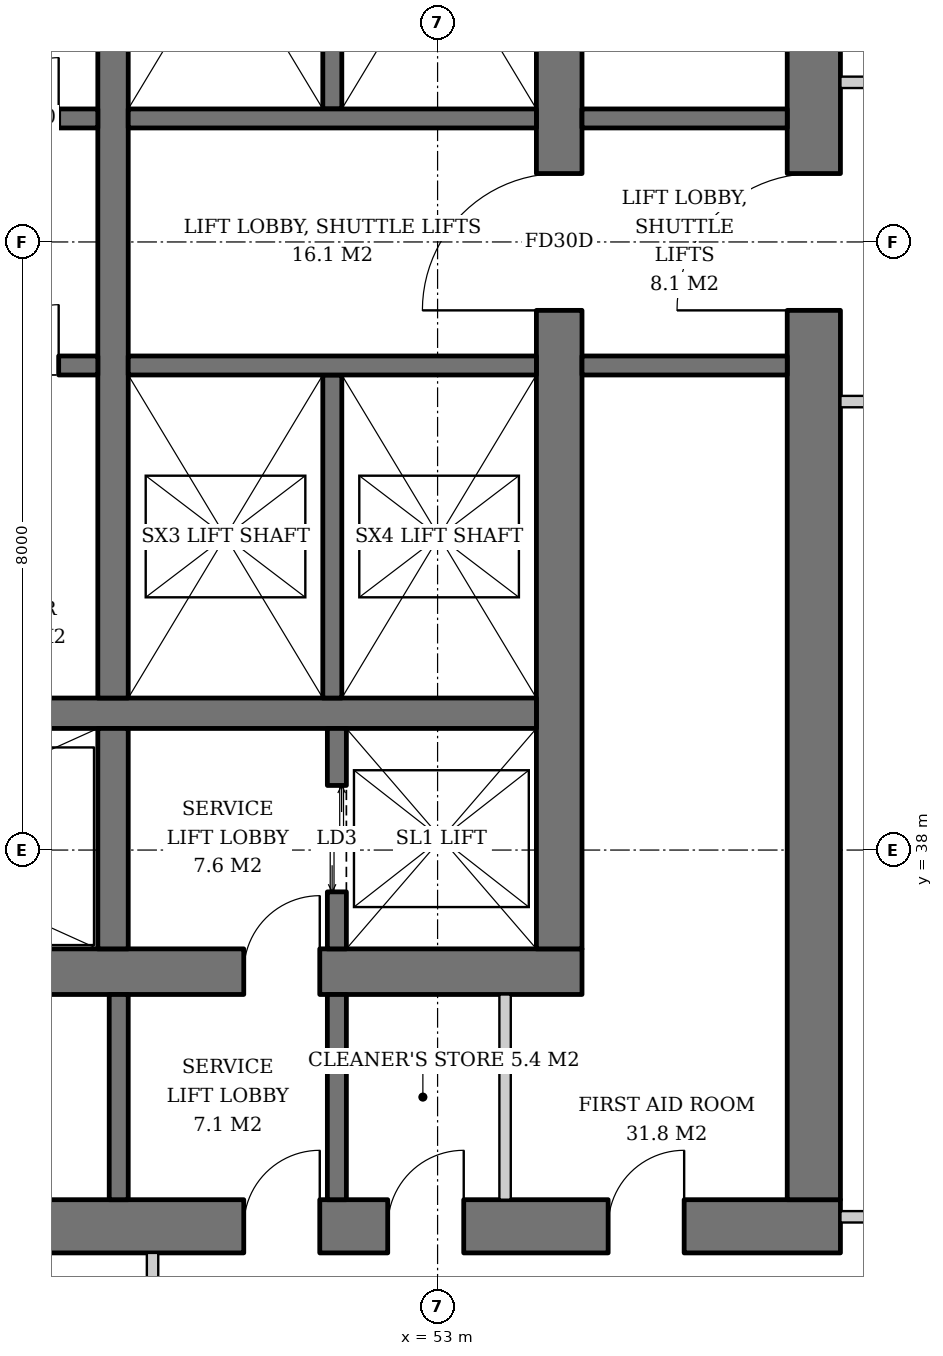
"""IFC4 building model, lengths in metres.
Left out: names, types, materials, properties, quantities, classifications, styles, units other than length and angle.
Written with IfcOpenShell. Run it as: python <this file> out.ifc"""

import sys

from ifc_helpers import new_model, si_unit, direction, frame, frame_2d, origin, place, context, subcontext, project, spatial, rectangle, extrude, element, fill, save


model = new_model("IFC4")
c1 = context("Model", 3, precision=1e-05, world=origin(), true_north=direction((0.0, 1.0)))
c2 = subcontext(c1, "Body", "Model", "MODEL_VIEW")
j1 = project(units=[si_unit("LENGTHUNIT", "METRE"), si_unit("PLANEANGLEUNIT", "RADIAN")], contexts=[c1])
p1 = place(None, origin())
s1 = spatial("IfcSite", under=j1, at=p1, CompositionType="ELEMENT")
p2 = place(p1, origin())
s2 = spatial("IfcBuilding", under=s1, at=p2, CompositionType="ELEMENT")
p3 = place(p2, frame((0.0, 0.0, 142.6)))
s3 = spatial("IfcBuildingStorey", under=s2, at=p3, CompositionType="ELEMENT", Elevation=142.6)
p4 = place(p3, frame((35.1, 36.4, 0.0), z_axis=(0.0, 0.0, 1.0), x_axis=(1.0, 0.0, 0.0)))
e1 = element("IfcWall", 1, at=p4, inside=s3, PredefinedType="SHEAR", context=c2, shape_type="SweptSolid", body=[
    extrude(rectangle(XDim=19.8, YDim=0.6, at=frame_2d((9.9, 0.0))), origin(), (0.0, 0.0, 1.0), 3.8),
])
p5 = place(p4, frame((3.9, 0.0, 0.0)))
e2 = element("IfcOpeningElement", 2, at=p5, cuts=e1, PredefinedType="OPENING", context=c2, shape_type="SweptSolid", body=[
    extrude(rectangle(XDim=1.0, YDim=2.1, at=frame_2d((0.5, 1.05))), frame((0.0, 0.31, 0.0), z_axis=(0.0, -1.0, 0.0), x_axis=(1.0, 0.0, 0.0)), (0.0, 0.0, 1.0), 0.62),
])
p6 = place(p4, frame((15.35, 0.0, 0.0)))
e3 = element("IfcOpeningElement", 3, at=p6, cuts=e1, PredefinedType="OPENING", context=c2, shape_type="SweptSolid", body=[
    extrude(rectangle(XDim=1.0, YDim=2.1, at=frame_2d((0.5, 1.05))), frame((0.0, 0.31, 0.0), z_axis=(0.0, -1.0, 0.0), x_axis=(1.0, 0.0, 0.0)), (0.0, 0.0, 1.0), 0.62),
])
p7 = place(p3, frame((54.6, 36.7, 0.0), z_axis=(0.0, 0.0, 1.0), x_axis=(0.0, 1.0, 0.0)))
e4 = element("IfcWall", 4, at=p7, inside=s3, PredefinedType="SHEAR", context=c2, shape_type="SweptSolid", body=[
    extrude(rectangle(XDim=18.6, YDim=0.6, at=frame_2d((9.3, 0.0))), origin(), (0.0, 0.0, 1.0), 3.8),
])
p8 = place(p7, frame((8.4, 0.0, 0.0)))
e5 = element("IfcOpeningElement", 5, at=p8, cuts=e4, PredefinedType="OPENING", context=c2, shape_type="SweptSolid", body=[
    extrude(rectangle(XDim=1.8, YDim=2.4, at=frame_2d((0.9, 1.2))), frame((0.0, 0.31, 0.0), z_axis=(0.0, -1.0, 0.0), x_axis=(1.0, 0.0, 0.0)), (0.0, 0.0, 1.0), 0.62),
])
p9 = place(p3, frame((31.7, 33.05, 0.0), z_axis=(0.0, 0.0, 1.0), x_axis=(1.0, 0.0, 0.0)))
e6 = element("IfcWall", 6, at=p9, inside=s3, PredefinedType="SHEAR", context=c2, shape_type="SweptSolid", body=[
    extrude(rectangle(XDim=26.6, YDim=0.7, at=frame_2d((13.3, 0.0))), origin(), (0.0, 0.0, 1.0), 3.8),
])
p10 = place(p9, frame((7.3, 0.0, 0.0)))
e7 = element("IfcOpeningElement", 7, at=p10, cuts=e6, PredefinedType="OPENING", context=c2, shape_type="SweptSolid", body=[
    extrude(rectangle(XDim=1.0, YDim=2.1, at=frame_2d((0.5, 1.05))), frame((0.0, 0.36, 0.0), z_axis=(0.0, -1.0, 0.0), x_axis=(1.0, 0.0, 0.0)), (0.0, 0.0, 1.0), 0.72),
])
p11 = place(p9, frame((18.75, 0.0, 0.0)))
e8 = element("IfcOpeningElement", 8, at=p11, cuts=e6, PredefinedType="OPENING", context=c2, shape_type="SweptSolid", body=[
    extrude(rectangle(XDim=1.0, YDim=2.1, at=frame_2d((0.5, 1.05))), frame((0.0, 0.36, 0.0), z_axis=(0.0, -1.0, 0.0), x_axis=(1.0, 0.0, 0.0)), (0.0, 0.0, 1.0), 0.72),
])
p12 = place(p9, frame((1.85, 0.0, 0.0)))
e9 = element("IfcOpeningElement", 9, at=p12, cuts=e6, PredefinedType="OPENING", context=c2, shape_type="SweptSolid", body=[
    extrude(rectangle(XDim=1.0, YDim=2.1, at=frame_2d((0.5, 1.05))), frame((0.0, 0.36, 0.0), z_axis=(0.0, -1.0, 0.0), x_axis=(1.0, 0.0, 0.0)), (0.0, 0.0, 1.0), 0.72),
])
p13 = place(p9, frame((4.7, 0.0, 0.0)))
e10 = element("IfcOpeningElement", 10, at=p13, cuts=e6, PredefinedType="OPENING", context=c2, shape_type="SweptSolid", body=[
    extrude(rectangle(XDim=1.0, YDim=2.1, at=frame_2d((0.5, 1.05))), frame((0.0, 0.36, 0.0), z_axis=(0.0, -1.0, 0.0), x_axis=(1.0, 0.0, 0.0)), (0.0, 0.0, 1.0), 0.72),
])
p14 = place(p9, frame((12.44, 0.0, 0.0)))
e11 = element("IfcOpeningElement", 11, at=p14, cuts=e6, PredefinedType="OPENING", context=c2, shape_type="SweptSolid", body=[
    extrude(rectangle(XDim=1.0, YDim=2.1, at=frame_2d((0.5, 1.05))), frame((0.0, 0.36, 0.0), z_axis=(0.0, -1.0, 0.0), x_axis=(1.0, 0.0, 0.0)), (0.0, 0.0, 1.0), 0.72),
])
p15 = place(p9, frame((20.644, 0.0, 0.0)))
e12 = element("IfcOpeningElement", 12, at=p15, cuts=e6, PredefinedType="OPENING", context=c2, shape_type="SweptSolid", body=[
    extrude(rectangle(XDim=1.0, YDim=2.1, at=frame_2d((0.5, 1.05))), frame((0.0, 0.36, 0.0), z_axis=(0.0, -1.0, 0.0), x_axis=(1.0, 0.0, 0.0)), (0.0, 0.0, 1.0), 0.72),
])
p16 = place(p9, frame((23.544, 0.0, 0.0)))
e13 = element("IfcOpeningElement", 13, at=p16, cuts=e6, PredefinedType="OPENING", context=c2, shape_type="SweptSolid", body=[
    extrude(rectangle(XDim=1.0, YDim=2.1, at=frame_2d((0.5, 1.05))), frame((0.0, 0.36, 0.0), z_axis=(0.0, -1.0, 0.0), x_axis=(1.0, 0.0, 0.0)), (0.0, 0.0, 1.0), 0.72),
])
p17 = place(p3, frame((57.95, 33.4, 0.0), z_axis=(0.0, 0.0, 1.0), x_axis=(0.0, 1.0, 0.0)))
e14 = element("IfcWall", 14, at=p17, inside=s3, PredefinedType="SHEAR", context=c2, shape_type="SweptSolid", body=[
    extrude(rectangle(XDim=25.2, YDim=0.7, at=frame_2d((12.6, 0.0))), origin(), (0.0, 0.0, 1.0), 3.8),
])
p18 = place(p17, frame((11.7, 0.0, 0.0)))
e15 = element("IfcOpeningElement", 15, at=p18, cuts=e14, PredefinedType="OPENING", context=c2, shape_type="SweptSolid", body=[
    extrude(rectangle(XDim=1.8, YDim=2.4, at=frame_2d((0.9, 1.2))), frame((0.0, 0.36, 0.0), z_axis=(0.0, -1.0, 0.0), x_axis=(1.0, 0.0, 0.0)), (0.0, 0.0, 1.0), 0.72),
])
p19 = place(p3, frame((35.7, 39.8, 0.0), z_axis=(0.0, 0.0, 1.0), x_axis=(1.0, 0.0, 0.0)))
e16 = element("IfcWall", 16, at=p19, inside=s3, PredefinedType="SHEAR", context=c2, shape_type="SweptSolid", body=[
    extrude(rectangle(XDim=18.6, YDim=0.4, at=frame_2d((9.3, 0.0))), origin(), (0.0, 0.0, 1.0), 3.8),
])
p20 = place(p3, frame((48.73, 36.7, 0.0), z_axis=(0.0, 0.0, 1.0), x_axis=(0.0, 1.0, 0.0)))
e17 = element("IfcWall", 17, at=p20, inside=s3, PredefinedType="SHEAR", context=c2, shape_type="SweptSolid", body=[
    extrude(rectangle(XDim=2.9, YDim=0.4, at=frame_2d((1.45, 0.0))), origin(), (0.0, 0.0, 1.0), 3.8),
])
p21 = place(p3, frame((48.73, 40.0, 0.0), z_axis=(0.0, 0.0, 1.0), x_axis=(0.0, 1.0, 0.0)))
e18 = element("IfcWall", 18, at=p21, inside=s3, PredefinedType="SHEAR", context=c2, shape_type="SweptSolid", body=[
    extrude(rectangle(XDim=12.0, YDim=0.4, at=frame_2d((6.0, 0.0))), origin(), (0.0, 0.0, 1.0), 3.8),
])
p22 = place(p3, frame((51.675, 36.7, 0.0), z_axis=(0.0, 0.0, 1.0), x_axis=(0.0, 1.0, 0.0)))
e19 = element("IfcWall", 19, at=p22, inside=s3, PredefinedType="SHEAR", context=c2, shape_type="SweptSolid", body=[
    extrude(rectangle(XDim=2.9, YDim=0.25, at=frame_2d((1.45, 0.0))), origin(), (0.0, 0.0, 1.0), 3.8),
])
p23 = place(p22, frame((0.75, 0.0, 0.0)))
e20 = element("IfcOpeningElement", 20, at=p23, cuts=e19, PredefinedType="OPENING", context=c2, shape_type="SweptSolid", body=[
    extrude(rectangle(XDim=1.4, YDim=2.4, at=frame_2d((0.7, 1.2))), frame((0.0, 0.135, 0.0), z_axis=(0.0, -1.0, 0.0), x_axis=(1.0, 0.0, 0.0)), (0.0, 0.0, 1.0), 0.27),
])
p24 = place(p3, frame((35.7, 47.625, 0.0), z_axis=(0.0, 0.0, 1.0), x_axis=(1.0, 0.0, 0.0)))
e21 = element("IfcWall", 21, at=p24, inside=s3, PredefinedType="SHEAR", context=c2, shape_type="SweptSolid", body=[
    extrude(rectangle(XDim=12.83, YDim=0.25, at=frame_2d((6.415, 0.0))), origin(), (0.0, 0.0, 1.0), 3.8),
])
p25 = place(p24, frame((0.7, 0.0, 0.0)))
e22 = element("IfcOpeningElement", 22, at=p25, cuts=e21, PredefinedType="OPENING", context=c2, shape_type="SweptSolid", body=[
    extrude(rectangle(XDim=1.1, YDim=2.2, at=frame_2d((0.55, 1.1))), frame((0.0, 0.135, 0.0), z_axis=(0.0, -1.0, 0.0), x_axis=(1.0, 0.0, 0.0)), (0.0, 0.0, 1.0), 0.27),
])
p26 = place(p24, frame((3.45, 0.0, 0.0)))
e23 = element("IfcOpeningElement", 23, at=p26, cuts=e21, PredefinedType="OPENING", context=c2, shape_type="SweptSolid", body=[
    extrude(rectangle(XDim=1.1, YDim=2.2, at=frame_2d((0.55, 1.1))), frame((0.0, 0.135, 0.0), z_axis=(0.0, -1.0, 0.0), x_axis=(1.0, 0.0, 0.0)), (0.0, 0.0, 1.0), 0.27),
])
p27 = place(p24, frame((6.2, 0.0, 0.0)))
e24 = element("IfcOpeningElement", 24, at=p27, cuts=e21, PredefinedType="OPENING", context=c2, shape_type="SweptSolid", body=[
    extrude(rectangle(XDim=1.1, YDim=2.2, at=frame_2d((0.55, 1.1))), frame((0.0, 0.135, 0.0), z_axis=(0.0, -1.0, 0.0), x_axis=(1.0, 0.0, 0.0)), (0.0, 0.0, 1.0), 0.27),
])
p28 = place(p24, frame((8.95, 0.0, 0.0)))
e25 = element("IfcOpeningElement", 25, at=p28, cuts=e21, PredefinedType="OPENING", context=c2, shape_type="SweptSolid", body=[
    extrude(rectangle(XDim=1.1, YDim=2.2, at=frame_2d((0.55, 1.1))), frame((0.0, 0.135, 0.0), z_axis=(0.0, -1.0, 0.0), x_axis=(1.0, 0.0, 0.0)), (0.0, 0.0, 1.0), 0.27),
])
p29 = place(p24, frame((11.515, 0.0, 0.0)))
e26 = element("IfcOpeningElement", 26, at=p29, cuts=e21, PredefinedType="OPENING", context=c2, shape_type="SweptSolid", body=[
    extrude(rectangle(XDim=0.8, YDim=2.0, at=frame_2d((0.4, 1.0))), frame((0.0, 0.135, 0.0), z_axis=(0.0, -1.0, 0.0), x_axis=(1.0, 0.0, 0.0)), (0.0, 0.0, 1.0), 0.27),
])
p30 = place(p3, frame((35.7, 44.375, 0.0), z_axis=(0.0, 0.0, 1.0), x_axis=(1.0, 0.0, 0.0)))
e27 = element("IfcWall", 27, at=p30, inside=s3, PredefinedType="SHEAR", context=c2, shape_type="SweptSolid", body=[
    extrude(rectangle(XDim=12.83, YDim=0.25, at=frame_2d((6.415, 0.0))), origin(), (0.0, 0.0, 1.0), 3.8),
])
p31 = place(p30, frame((0.7, 0.0, 0.0)))
e28 = element("IfcOpeningElement", 28, at=p31, cuts=e27, PredefinedType="OPENING", context=c2, shape_type="SweptSolid", body=[
    extrude(rectangle(XDim=1.1, YDim=2.2, at=frame_2d((0.55, 1.1))), frame((0.0, 0.135, 0.0), z_axis=(0.0, -1.0, 0.0), x_axis=(1.0, 0.0, 0.0)), (0.0, 0.0, 1.0), 0.27),
])
p32 = place(p30, frame((3.45, 0.0, 0.0)))
e29 = element("IfcOpeningElement", 29, at=p32, cuts=e27, PredefinedType="OPENING", context=c2, shape_type="SweptSolid", body=[
    extrude(rectangle(XDim=1.1, YDim=2.2, at=frame_2d((0.55, 1.1))), frame((0.0, 0.135, 0.0), z_axis=(0.0, -1.0, 0.0), x_axis=(1.0, 0.0, 0.0)), (0.0, 0.0, 1.0), 0.27),
])
p33 = place(p30, frame((6.2, 0.0, 0.0)))
e30 = element("IfcOpeningElement", 30, at=p33, cuts=e27, PredefinedType="OPENING", context=c2, shape_type="SweptSolid", body=[
    extrude(rectangle(XDim=1.1, YDim=2.2, at=frame_2d((0.55, 1.1))), frame((0.0, 0.135, 0.0), z_axis=(0.0, -1.0, 0.0), x_axis=(1.0, 0.0, 0.0)), (0.0, 0.0, 1.0), 0.27),
])
p34 = place(p30, frame((8.95, 0.0, 0.0)))
e31 = element("IfcOpeningElement", 31, at=p34, cuts=e27, PredefinedType="OPENING", context=c2, shape_type="SweptSolid", body=[
    extrude(rectangle(XDim=1.1, YDim=2.2, at=frame_2d((0.55, 1.1))), frame((0.0, 0.135, 0.0), z_axis=(0.0, -1.0, 0.0), x_axis=(1.0, 0.0, 0.0)), (0.0, 0.0, 1.0), 0.27),
])
p35 = place(p30, frame((11.515, 0.0, 0.0)))
e32 = element("IfcOpeningElement", 32, at=p35, cuts=e27, PredefinedType="OPENING", context=c2, shape_type="SweptSolid", body=[
    extrude(rectangle(XDim=0.8, YDim=2.0, at=frame_2d((0.4, 1.0))), frame((0.0, 0.135, 0.0), z_axis=(0.0, -1.0, 0.0), x_axis=(1.0, 0.0, 0.0)), (0.0, 0.0, 1.0), 0.27),
])
p36 = place(p3, frame((51.615, 47.75, 0.0), z_axis=(0.0, 0.0, 1.0), x_axis=(0.0, 1.0, 0.0)))
e33 = element("IfcWall", 33, at=p36, inside=s3, PredefinedType="SHEAR", context=c2, shape_type="SweptSolid", body=[
    extrude(rectangle(XDim=4.25, YDim=0.25, at=frame_2d((2.125, 0.0))), origin(), (0.0, 0.0, 1.0), 3.8),
])
p37 = place(p3, frame((48.93, 47.625, 0.0), z_axis=(0.0, 0.0, 1.0), x_axis=(1.0, 0.0, 0.0)))
e34 = element("IfcWall", 34, at=p37, inside=s3, PredefinedType="SHEAR", context=c2, shape_type="SweptSolid", body=[
    extrude(rectangle(XDim=5.37, YDim=0.25, at=frame_2d((2.685, 0.0))), origin(), (0.0, 0.0, 1.0), 3.8),
])
p38 = place(p3, frame((51.615, 44.25, 0.0), z_axis=(0.0, 0.0, 1.0), x_axis=(0.0, -1.0, 0.0)))
e35 = element("IfcWall", 35, at=p38, inside=s3, PredefinedType="SHEAR", context=c2, shape_type="SweptSolid", body=[
    extrude(rectangle(XDim=4.25, YDim=0.25, at=frame_2d((2.125, 0.0))), origin(), (0.0, 0.0, 1.0), 3.8),
])
p39 = place(p3, frame((48.93, 44.375, 0.0), z_axis=(0.0, 0.0, 1.0), x_axis=(1.0, 0.0, 0.0)))
e36 = element("IfcWall", 36, at=p39, inside=s3, PredefinedType="SHEAR", context=c2, shape_type="SweptSolid", body=[
    extrude(rectangle(XDim=5.37, YDim=0.25, at=frame_2d((2.685, 0.0))), origin(), (0.0, 0.0, 1.0), 3.8),
])
for number, where, z_axis, x_axis in (
    (37, (54.9, 44.375, 0.0), (0.0, 0.0, 1.0), (1.0, 0.0, 0.0)),
    (38, (54.9, 47.625, 0.0), (0.0, 0.0, 1.0), (1.0, 0.0, 0.0)),
    (39, (48.805, 33.4, 0.0), (0.0, 0.0, 1.0), (0.0, 1.0, 0.0)),
    (40, (51.675, 33.4, 0.0), (0.0, 0.0, 1.0), (0.0, 1.0, 0.0)),
):
    element("IfcWall", number, at=place(p3, frame(where, z_axis=z_axis, x_axis=x_axis)), inside=s3, PredefinedType="SOLIDWALL", context=c2, shape_type="SweptSolid", body=[
        extrude(rectangle(XDim=2.7, YDim=0.25, at=frame_2d((1.35, 0.0))), origin(), (0.0, 0.0, 1.0), 3.62),
    ])
p40 = place(p3, frame((53.888, 33.4, 0.0), z_axis=(0.0, 0.0, 1.0), x_axis=(0.0, 1.0, 0.0)))
e41 = element("IfcWall", 41, at=p40, inside=s3, PredefinedType="SOLIDWALL", context=c2, shape_type="SweptSolid", body=[
    extrude(rectangle(XDim=2.7, YDim=0.15, at=frame_2d((1.35, 0.0))), origin(), (0.0, 0.0, 1.0), 3.62),
])
p41 = place(p3, frame((58.3, 33.175, 0.0), z_axis=(0.0, 0.0, 1.0), x_axis=(1.0, 0.0, 0.0)))
e42 = element("IfcWall", 42, at=p41, inside=s3, PredefinedType="PARTITIONING", context=c2, shape_type="SweptSolid", body=[
    extrude(rectangle(XDim=2.325, YDim=0.15, at=frame_2d((1.163, 0.0))), origin(), (0.0, 0.0, 1.0), 2.72),
])
for number, where, z_axis, x_axis in (
    (43, (58.3, 43.9, 0.0), (0.0, 0.0, 1.0), (1.0, 0.0, 0.0)),
    (44, (58.3, 48.1, 0.0), (0.0, 0.0, 1.0), (1.0, 0.0, 0.0)),
    (45, (49.25, 32.7, 0.0), (0.0, 0.0, 1.0), (0.0, -1.0, 0.0)),
):
    element("IfcWall", number, at=place(p3, frame(where, z_axis=z_axis, x_axis=x_axis)), inside=s3, PredefinedType="PARTITIONING", context=c2, shape_type="SweptSolid", body=[
        extrude(rectangle(XDim=2.325, YDim=0.15, at=frame_2d((1.163, 0.0))), origin(), (0.0, 0.0, 1.0), 3.62),
    ])
p42 = place(p23, origin())
e46 = element("IfcDoor", 46, at=p42, inside=s3, OperationType="DOUBLE_DOOR_SLIDING", PredefinedType="DOOR", context=c2, shape_type="SweptSolid", body=[
    extrude(rectangle(XDim=1.4, YDim=2.4, at=frame_2d((0.7, 1.2))), frame((0.0, 0.025, 0.0), z_axis=(0.0, -1.0, 0.0), x_axis=(1.0, 0.0, 0.0)), (0.0, 0.0, 1.0), 0.05),
])
fill(e20, e46)
p43 = place(p29, origin())
e47 = element("IfcDoor", 47, at=p43, inside=s3, OperationType="SINGLE_SWING_RIGHT", PredefinedType="DOOR", context=c2, shape_type="SweptSolid", body=[
    extrude(rectangle(XDim=0.8, YDim=2.0, at=frame_2d((0.4, 1.0))), frame((0.0, 0.025, 0.0), z_axis=(0.0, -1.0, 0.0), x_axis=(1.0, 0.0, 0.0)), (0.0, 0.0, 1.0), 0.05),
])
fill(e26, e47)
p44 = place(p35, origin())
e48 = element("IfcDoor", 48, at=p44, inside=s3, OperationType="SINGLE_SWING_RIGHT", PredefinedType="DOOR", context=c2, shape_type="SweptSolid", body=[
    extrude(rectangle(XDim=0.8, YDim=2.0, at=frame_2d((0.4, 1.0))), frame((0.0, 0.025, 0.0), z_axis=(0.0, -1.0, 0.0), x_axis=(1.0, 0.0, 0.0)), (0.0, 0.0, 1.0), 0.05),
])
fill(e32, e48)
p45 = place(p8, origin())
e49 = element("IfcDoor", 49, at=p45, inside=s3, OperationType="DOUBLE_DOOR_SINGLE_SWING", PredefinedType="DOOR", context=c2, shape_type="SweptSolid", body=[
    extrude(rectangle(XDim=1.8, YDim=2.4, at=frame_2d((0.9, 1.2))), frame((0.0, 0.025, 0.0), z_axis=(0.0, -1.0, 0.0), x_axis=(1.0, 0.0, 0.0)), (0.0, 0.0, 1.0), 0.05),
])
fill(e5, e49)
p46 = place(p6, origin())
e50 = element("IfcDoor", 50, at=p46, inside=s3, OperationType="SINGLE_SWING_RIGHT", PredefinedType="DOOR", context=c2, shape_type="SweptSolid", body=[
    extrude(rectangle(XDim=1.0, YDim=2.1, at=frame_2d((0.5, 1.05))), frame((0.0, 0.025, 0.0), z_axis=(0.0, -1.0, 0.0), x_axis=(1.0, 0.0, 0.0)), (0.0, 0.0, 1.0), 0.05),
])
fill(e3, e50)
p47 = place(p18, origin())
e51 = element("IfcDoor", 51, at=p47, inside=s3, OperationType="DOUBLE_DOOR_SINGLE_SWING", PredefinedType="DOOR", context=c2, shape_type="SweptSolid", body=[
    extrude(rectangle(XDim=1.8, YDim=2.4, at=frame_2d((0.9, 1.2))), frame((0.0, 0.025, 0.0), z_axis=(0.0, -1.0, 0.0), x_axis=(1.0, 0.0, 0.0)), (0.0, 0.0, 1.0), 0.05),
])
fill(e15, e51)
p48 = place(p11, origin())
e52 = element("IfcDoor", 52, at=p48, inside=s3, OperationType="SINGLE_SWING_RIGHT", PredefinedType="DOOR", context=c2, shape_type="SweptSolid", body=[
    extrude(rectangle(XDim=1.0, YDim=2.1, at=frame_2d((0.5, 1.05))), frame((0.0, 0.025, 0.0), z_axis=(0.0, -1.0, 0.0), x_axis=(1.0, 0.0, 0.0)), (0.0, 0.0, 1.0), 0.05),
])
fill(e8, e52)
p49 = place(p15, origin())
e53 = element("IfcDoor", 53, at=p49, inside=s3, OperationType="SINGLE_SWING_RIGHT", PredefinedType="DOOR", context=c2, shape_type="SweptSolid", body=[
    extrude(rectangle(XDim=1.0, YDim=2.1, at=frame_2d((0.5, 1.05))), frame((0.0, 0.34, 0.0), z_axis=(0.0, -1.0, 0.0), x_axis=(1.0, 0.0, 0.0)), (0.0, 0.0, 1.0), 0.05),
])
fill(e12, e53)
p50 = place(p16, origin())
e54 = element("IfcDoor", 54, at=p50, inside=s3, OperationType="SINGLE_SWING_RIGHT", PredefinedType="DOOR", context=c2, shape_type="SweptSolid", body=[
    extrude(rectangle(XDim=1.0, YDim=2.1, at=frame_2d((0.5, 1.05))), frame((0.0, 0.34, 0.0), z_axis=(0.0, -1.0, 0.0), x_axis=(1.0, 0.0, 0.0)), (0.0, 0.0, 1.0), 0.05),
])
fill(e13, e54)
save(model, sys.argv[1])
